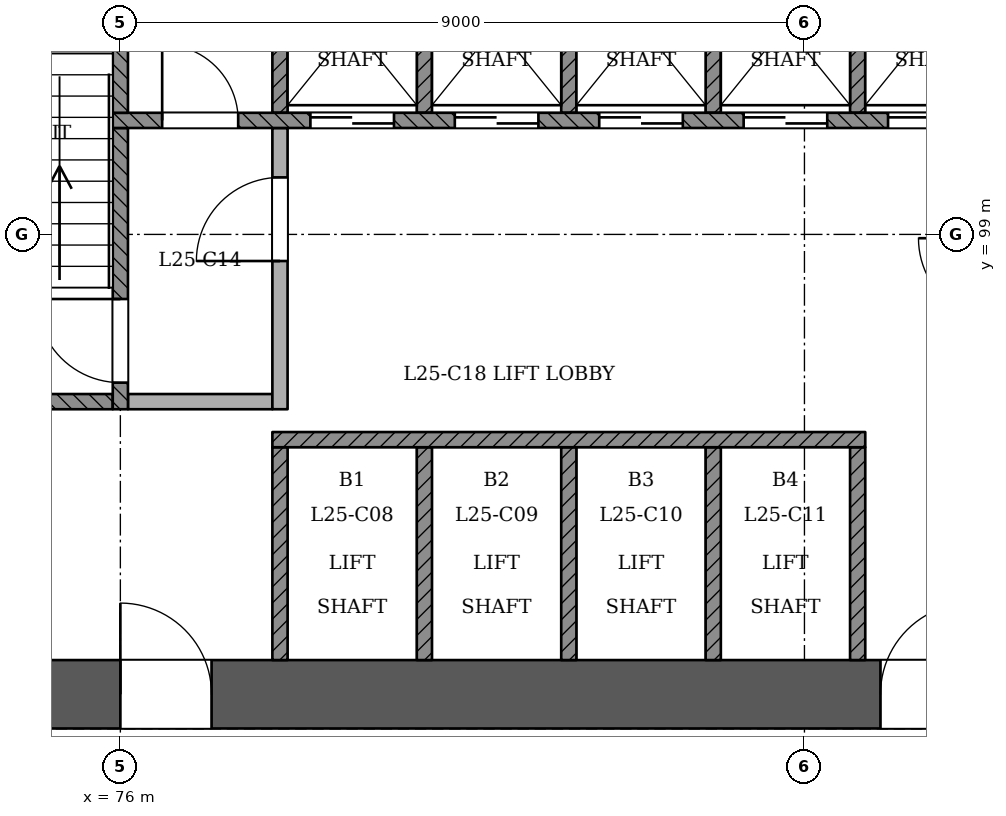
"""IFC4 building model, lengths in metres.
Left out: names, types, materials, properties, quantities, classifications, styles, units other than length and angle.
Written with IfcOpenShell. Run it as: python <this file> out.ifc"""

import sys

from ifc_helpers import new_model, si_unit, direction, frame, frame_2d, origin, place, context, subcontext, project, spatial, rectangle, extrude, element, fill, save


model = new_model("IFC4")
c1 = context("Model", 3, precision=1e-05, world=origin(), true_north=direction((0.0, 1.0)))
c2 = subcontext(c1, "Body", "Model", "MODEL_VIEW")
j1 = project(units=[si_unit("LENGTHUNIT", "METRE"), si_unit("PLANEANGLEUNIT", "RADIAN")], contexts=[c1])
p1 = place(None, origin())
s1 = spatial("IfcSite", under=j1, at=p1, CompositionType="ELEMENT")
p2 = place(p1, origin())
s2 = spatial("IfcBuilding", under=s1, at=p2, CompositionType="ELEMENT")
p3 = place(p2, frame((0.0, 0.0, 100.8)))
s3 = spatial("IfcBuildingStorey", under=s2, at=p3, CompositionType="ELEMENT", Elevation=100.8)
p4 = place(p3, frame((72.55, 92.95, 0.0), z_axis=(0.0, 0.0, 1.0), x_axis=(1.0, 0.0, 0.0)))
e1 = element("IfcWall", 1, at=p4, inside=s3, PredefinedType="SHEAR", context=c2, shape_type="SweptSolid", body=[
    extrude(rectangle(XDim=25.35, YDim=0.9, at=frame_2d((12.675, 0.0))), origin(), (0.0, 0.0, 1.0), 3.6),
])
p5 = place(p4, frame((1.25, 0.0, 0.0)))
e2 = element("IfcOpeningElement", 2, at=p5, cuts=e1, PredefinedType="OPENING", context=c2, shape_type="SweptSolid", body=[
    extrude(rectangle(XDim=1.2, YDim=2.1, at=frame_2d((0.6, 1.05))), frame((0.0, 0.46, 0.0), z_axis=(0.0, -1.0, 0.0), x_axis=(1.0, 0.0, 0.0)), (0.0, 0.0, 1.0), 0.921),
])
p6 = place(p4, frame((3.45, 0.0, 0.0)))
e3 = element("IfcOpeningElement", 3, at=p6, cuts=e1, PredefinedType="OPENING", context=c2, shape_type="SweptSolid", body=[
    extrude(rectangle(XDim=1.2, YDim=2.1, at=frame_2d((0.6, 1.05))), frame((0.0, 0.46, 0.0), z_axis=(0.0, -1.0, 0.0), x_axis=(1.0, 0.0, 0.0)), (0.0, 0.0, 1.0), 0.921),
])
p7 = place(p4, frame((13.45, 0.0, 0.0)))
e4 = element("IfcOpeningElement", 4, at=p7, cuts=e1, PredefinedType="OPENING", context=c2, shape_type="SweptSolid", body=[
    extrude(rectangle(XDim=1.2, YDim=2.1, at=frame_2d((0.6, 1.05))), frame((0.0, 0.46, 0.0), z_axis=(0.0, -1.0, 0.0), x_axis=(1.0, 0.0, 0.0)), (0.0, 0.0, 1.0), 0.921),
])
p8 = place(p4, frame((16.163, 0.0, 0.0)))
e5 = element("IfcOpeningElement", 5, at=p8, cuts=e1, PredefinedType="OPENING", context=c2, shape_type="SweptSolid", body=[
    extrude(rectangle(XDim=1.0, YDim=2.1, at=frame_2d((0.5, 1.05))), frame((0.0, 0.46, 0.0), z_axis=(0.0, -1.0, 0.0), x_axis=(1.0, 0.0, 0.0)), (0.0, 0.0, 1.0), 0.921),
])
p9 = place(p4, frame((20.05, 0.0, 0.0)))
e6 = element("IfcOpeningElement", 6, at=p9, cuts=e1, PredefinedType="OPENING", context=c2, shape_type="SweptSolid", body=[
    extrude(rectangle(XDim=1.0, YDim=2.1, at=frame_2d((0.5, 1.05))), frame((0.0, 0.46, 0.0), z_axis=(0.0, -1.0, 0.0), x_axis=(1.0, 0.0, 0.0)), (0.0, 0.0, 1.0), 0.921),
])
p10 = place(p4, frame((23.188, 0.0, 0.0)))
e7 = element("IfcOpeningElement", 7, at=p10, cuts=e1, PredefinedType="OPENING", context=c2, shape_type="SweptSolid", body=[
    extrude(rectangle(XDim=1.0, YDim=2.1, at=frame_2d((0.5, 1.05))), frame((0.0, 0.46, 0.0), z_axis=(0.0, -1.0, 0.0), x_axis=(1.0, 0.0, 0.0)), (0.0, 0.0, 1.0), 0.921),
])
p11 = place(p3, frame((63.623, 97.706, 0.0), z_axis=(0.0, 0.0, 1.0), x_axis=(0.500000781663, -0.866024952491, 0.0)))
e8 = element("IfcWall", 8, at=p11, inside=s3, PredefinedType="PARTITIONING", context=c2, shape_type="SweptSolid", body=[
    extrude(rectangle(XDim=41.837, YDim=0.15, at=frame_2d((20.919, 0.0))), origin(), (0.0, 0.0, 1.0), 2.7),
])
p12 = place(p11, frame((2.912, 0.0, 0.0)))
e9 = element("IfcOpeningElement", 9, at=p12, cuts=e8, PredefinedType="OPENING", context=c2, shape_type="SweptSolid", body=[
    extrude(rectangle(XDim=1.2, YDim=2.1, at=frame_2d((0.6, 1.05))), frame((0.0, 0.085, 0.0), z_axis=(0.0, -1.0, 0.0), x_axis=(1.0, 0.0, 0.0)), (0.0, 0.0, 1.0), 0.171),
])
p13 = place(p11, frame((10.198, 0.0, 0.0)))
e10 = element("IfcOpeningElement", 10, at=p13, cuts=e8, PredefinedType="OPENING", context=c2, shape_type="SweptSolid", body=[
    extrude(rectangle(XDim=1.0, YDim=2.1, at=frame_2d((0.5, 1.05))), frame((0.0, 0.085, 0.0), z_axis=(0.0, -1.0, 0.0), x_axis=(1.0, 0.0, 0.0)), (0.0, 0.0, 1.0), 0.171),
])
p14 = place(p11, frame((12.523, 0.0, 0.0)))
e11 = element("IfcOpeningElement", 11, at=p14, cuts=e8, PredefinedType="OPENING", context=c2, shape_type="SweptSolid", body=[
    extrude(rectangle(XDim=1.0, YDim=2.1, at=frame_2d((0.5, 1.05))), frame((0.0, 0.085, 0.0), z_axis=(0.0, -1.0, 0.0), x_axis=(1.0, 0.0, 0.0)), (0.0, 0.0, 1.0), 0.171),
])
p15 = place(p11, frame((19.314, 0.0, 0.0)))
e12 = element("IfcOpeningElement", 12, at=p15, cuts=e8, PredefinedType="OPENING", context=c2, shape_type="SweptSolid", body=[
    extrude(rectangle(XDim=1.0, YDim=2.1, at=frame_2d((0.5, 1.05))), frame((0.0, 0.085, 0.0), z_axis=(0.0, -1.0, 0.0), x_axis=(1.0, 0.0, 0.0)), (0.0, 0.0, 1.0), 0.171),
])
p16 = place(p11, frame((21.639, 0.0, 0.0)))
e13 = element("IfcOpeningElement", 13, at=p16, cuts=e8, PredefinedType="OPENING", context=c2, shape_type="SweptSolid", body=[
    extrude(rectangle(XDim=1.0, YDim=2.1, at=frame_2d((0.5, 1.05))), frame((0.0, 0.085, 0.0), z_axis=(0.0, -1.0, 0.0), x_axis=(1.0, 0.0, 0.0)), (0.0, 0.0, 1.0), 0.171),
])
p17 = place(p11, frame((27.169, 0.0, 0.0)))
e14 = element("IfcOpeningElement", 14, at=p17, cuts=e8, PredefinedType="OPENING", context=c2, shape_type="SweptSolid", body=[
    extrude(rectangle(XDim=1.0, YDim=2.1, at=frame_2d((0.5, 1.05))), frame((0.0, 0.085, 0.0), z_axis=(0.0, -1.0, 0.0), x_axis=(1.0, 0.0, 0.0)), (0.0, 0.0, 1.0), 0.171),
])
p18 = place(p11, frame((30.523, 0.0, 0.0)))
e15 = element("IfcOpeningElement", 15, at=p18, cuts=e8, PredefinedType="OPENING", context=c2, shape_type="SweptSolid", body=[
    extrude(rectangle(XDim=1.0, YDim=2.1, at=frame_2d((0.5, 1.05))), frame((0.0, 0.085, 0.0), z_axis=(0.0, -1.0, 0.0), x_axis=(1.0, 0.0, 0.0)), (0.0, 0.0, 1.0), 0.171),
])
p19 = place(p11, frame((37.725, 0.0, 0.0)))
e16 = element("IfcOpeningElement", 16, at=p19, cuts=e8, PredefinedType="OPENING", context=c2, shape_type="SweptSolid", body=[
    extrude(rectangle(XDim=1.2, YDim=2.1, at=frame_2d((0.6, 1.05))), frame((0.0, 0.085, 0.0), z_axis=(0.0, -1.0, 0.0), x_axis=(1.0, 0.0, 0.0)), (0.0, 0.0, 1.0), 0.171),
])
p20 = place(p3, frame((85.458, 61.474, 0.0), z_axis=(0.0, 0.0, 1.0), x_axis=(0.500000781663, 0.866024952491, 0.0)))
e17 = element("IfcWall", 17, at=p20, inside=s3, PredefinedType="PARTITIONING", context=c2, shape_type="SweptSolid", body=[
    extrude(rectangle(XDim=41.837, YDim=0.15, at=frame_2d((20.919, 0.0))), origin(), (0.0, 0.0, 1.0), 2.7),
])
p21 = place(p20, frame((0.253, 0.0, 0.0)))
e18 = element("IfcOpeningElement", 18, at=p21, cuts=e17, PredefinedType="OPENING", context=c2, shape_type="SweptSolid", body=[
    extrude(rectangle(XDim=1.2, YDim=2.1, at=frame_2d((0.6, 1.05))), frame((0.0, 0.085, 0.0), z_axis=(0.0, -1.0, 0.0), x_axis=(1.0, 0.0, 0.0)), (0.0, 0.0, 1.0), 0.171),
])
p22 = place(p20, frame((5.719, 0.0, 0.0)))
e19 = element("IfcOpeningElement", 19, at=p22, cuts=e17, PredefinedType="OPENING", context=c2, shape_type="SweptSolid", body=[
    extrude(rectangle(XDim=1.2, YDim=2.1, at=frame_2d((0.6, 1.05))), frame((0.0, 0.085, 0.0), z_axis=(0.0, -1.0, 0.0), x_axis=(1.0, 0.0, 0.0)), (0.0, 0.0, 1.0), 0.171),
])
p23 = place(p20, frame((13.669, 0.0, 0.0)))
e20 = element("IfcOpeningElement", 20, at=p23, cuts=e17, PredefinedType="OPENING", context=c2, shape_type="SweptSolid", body=[
    extrude(rectangle(XDim=1.0, YDim=2.1, at=frame_2d((0.5, 1.05))), frame((0.0, 0.085, 0.0), z_axis=(0.0, -1.0, 0.0), x_axis=(1.0, 0.0, 0.0)), (0.0, 0.0, 1.0), 0.171),
])
p24 = place(p20, frame((18.169, 0.0, 0.0)))
e21 = element("IfcOpeningElement", 21, at=p24, cuts=e17, PredefinedType="OPENING", context=c2, shape_type="SweptSolid", body=[
    extrude(rectangle(XDim=1.0, YDim=2.1, at=frame_2d((0.5, 1.05))), frame((0.0, 0.085, 0.0), z_axis=(0.0, -1.0, 0.0), x_axis=(1.0, 0.0, 0.0)), (0.0, 0.0, 1.0), 0.171),
])
p25 = place(p20, frame((21.639, 0.0, 0.0)))
e22 = element("IfcOpeningElement", 22, at=p25, cuts=e17, PredefinedType="OPENING", context=c2, shape_type="SweptSolid", body=[
    extrude(rectangle(XDim=1.0, YDim=2.1, at=frame_2d((0.5, 1.05))), frame((0.0, 0.085, 0.0), z_axis=(0.0, -1.0, 0.0), x_axis=(1.0, 0.0, 0.0)), (0.0, 0.0, 1.0), 0.171),
])
p26 = place(p20, frame((27.169, 0.0, 0.0)))
e23 = element("IfcOpeningElement", 23, at=p26, cuts=e17, PredefinedType="OPENING", context=c2, shape_type="SweptSolid", body=[
    extrude(rectangle(XDim=1.0, YDim=2.1, at=frame_2d((0.5, 1.05))), frame((0.0, 0.085, 0.0), z_axis=(0.0, -1.0, 0.0), x_axis=(1.0, 0.0, 0.0)), (0.0, 0.0, 1.0), 0.171),
])
p27 = place(p20, frame((30.639, 0.0, 0.0)))
e24 = element("IfcOpeningElement", 24, at=p27, cuts=e17, PredefinedType="OPENING", context=c2, shape_type="SweptSolid", body=[
    extrude(rectangle(XDim=1.0, YDim=2.1, at=frame_2d((0.5, 1.05))), frame((0.0, 0.085, 0.0), z_axis=(0.0, -1.0, 0.0), x_axis=(1.0, 0.0, 0.0)), (0.0, 0.0, 1.0), 0.171),
])
p28 = place(p20, frame((37.71, 0.0, 0.0)))
e25 = element("IfcOpeningElement", 25, at=p28, cuts=e17, PredefinedType="OPENING", context=c2, shape_type="SweptSolid", body=[
    extrude(rectangle(XDim=1.2, YDim=2.1, at=frame_2d((0.6, 1.05))), frame((0.0, 0.085, 0.0), z_axis=(0.0, -1.0, 0.0), x_axis=(1.0, 0.0, 0.0)), (0.0, 0.0, 1.0), 0.171),
])
for number, where, z_axis, x_axis in (
    (26, (78.1, 93.4, 0.0), (0.0, 0.0, 1.0), (0.0, 1.0, 0.0)),
    (27, (80.0, 93.4, 0.0), (0.0, 0.0, 1.0), (0.0, 1.0, 0.0)),
    (28, (81.9, 93.4, 0.0), (0.0, 0.0, 1.0), (0.0, 1.0, 0.0)),
    (29, (83.8, 93.4, 0.0), (0.0, 0.0, 1.0), (0.0, 1.0, 0.0)),
    (30, (85.7, 93.4, 0.0), (0.0, 0.0, 1.0), (0.0, 1.0, 0.0)),
):
    element("IfcWall", number, at=place(p3, frame(where, z_axis=z_axis, x_axis=x_axis)), inside=s3, PredefinedType="SOLIDWALL", context=c2, shape_type="SweptSolid", body=[
        extrude(rectangle(XDim=2.8, YDim=0.2, at=frame_2d((1.4, 0.0))), origin(), (0.0, 0.0, 1.0), 3.1),
    ])
p29 = place(p3, frame((78.0, 96.3, 0.0), z_axis=(0.0, 0.0, 1.0), x_axis=(1.0, 0.0, 0.0)))
e31 = element("IfcWall", 31, at=p29, inside=s3, PredefinedType="SOLIDWALL", context=c2, shape_type="SweptSolid", body=[
    extrude(rectangle(XDim=7.8, YDim=0.2, at=frame_2d((3.9, 0.0))), origin(), (0.0, 0.0, 1.0), 3.1),
])
p30 = place(p3, frame((73.0, 96.8, 0.0), z_axis=(0.0, 0.0, 1.0), x_axis=(1.0, 0.0, 0.0)))
e32 = element("IfcWall", 32, at=p30, inside=s3, PredefinedType="SOLIDWALL", context=c2, shape_type="SweptSolid", body=[
    extrude(rectangle(XDim=2.9, YDim=0.2, at=frame_2d((1.45, 0.0))), origin(), (0.0, 0.0, 1.0), 3.1),
])
p31 = place(p3, frame((76.0, 96.7, 0.0), z_axis=(0.0, 0.0, 1.0), x_axis=(0.0, 1.0, 0.0)))
e33 = element("IfcWall", 33, at=p31, inside=s3, PredefinedType="SOLIDWALL", context=c2, shape_type="SweptSolid", body=[
    extrude(rectangle(XDim=3.7, YDim=0.2, at=frame_2d((1.85, 0.0))), origin(), (0.0, 0.0, 1.0), 3.1),
])
p32 = place(p31, frame((0.35, 0.0, 0.0)))
e34 = element("IfcOpeningElement", 34, at=p32, cuts=e33, PredefinedType="OPENING", context=c2, shape_type="SweptSolid", body=[
    extrude(rectangle(XDim=1.1, YDim=2.1, at=frame_2d((0.55, 1.05))), frame((0.0, 0.11, 0.0), z_axis=(0.0, -1.0, 0.0), x_axis=(1.0, 0.0, 0.0)), (0.0, 0.0, 1.0), 0.221),
])
p33 = place(p3, frame((76.1, 96.8, 0.0), z_axis=(0.0, 0.0, 1.0), x_axis=(1.0, 0.0, 0.0)))
e35 = element("IfcWall", 35, at=p33, inside=s3, PredefinedType="PARTITIONING", context=c2, shape_type="SweptSolid", body=[
    extrude(rectangle(XDim=1.9, YDim=0.2, at=frame_2d((0.95, 0.0))), origin(), (0.0, 0.0, 1.0), 3.1),
])
p34 = place(p3, frame((78.1, 96.7, 0.0), z_axis=(0.0, 0.0, 1.0), x_axis=(0.0, 1.0, 0.0)))
e36 = element("IfcWall", 36, at=p34, inside=s3, PredefinedType="PARTITIONING", context=c2, shape_type="SweptSolid", body=[
    extrude(rectangle(XDim=3.7, YDim=0.2, at=frame_2d((1.85, 0.0))), origin(), (0.0, 0.0, 1.0), 3.1),
])
p35 = place(p34, frame((1.95, 0.0, 0.0)))
e37 = element("IfcOpeningElement", 37, at=p35, cuts=e36, PredefinedType="OPENING", context=c2, shape_type="SweptSolid", body=[
    extrude(rectangle(XDim=1.1, YDim=2.1, at=frame_2d((0.55, 1.05))), frame((0.0, 0.11, 0.0), z_axis=(0.0, -1.0, 0.0), x_axis=(1.0, 0.0, 0.0)), (0.0, 0.0, 1.0), 0.221),
])
p36 = place(p3, frame((75.9, 100.5, 0.0), z_axis=(0.0, 0.0, 1.0), x_axis=(1.0, 0.0, 0.0)))
e38 = element("IfcWall", 38, at=p36, inside=s3, PredefinedType="SOLIDWALL", context=c2, shape_type="SweptSolid", body=[
    extrude(rectangle(XDim=18.2, YDim=0.2, at=frame_2d((9.1, 0.0))), origin(), (0.0, 0.0, 1.0), 3.1),
])
p37 = place(p36, frame((2.6, 0.0, 0.0)))
e39 = element("IfcOpeningElement", 39, at=p37, cuts=e38, PredefinedType="OPENING", context=c2, shape_type="SweptSolid", body=[
    extrude(rectangle(XDim=1.1, YDim=2.1, at=frame_2d((0.55, 1.05))), frame((0.0, 0.11, 0.0), z_axis=(0.0, -1.0, 0.0), x_axis=(1.0, 0.0, 0.0)), (0.0, 0.0, 1.0), 0.221),
])
p38 = place(p36, frame((4.5, 0.0, 0.0)))
e40 = element("IfcOpeningElement", 40, at=p38, cuts=e38, PredefinedType="OPENING", context=c2, shape_type="SweptSolid", body=[
    extrude(rectangle(XDim=1.1, YDim=2.1, at=frame_2d((0.55, 1.05))), frame((0.0, 0.11, 0.0), z_axis=(0.0, -1.0, 0.0), x_axis=(1.0, 0.0, 0.0)), (0.0, 0.0, 1.0), 0.221),
])
p39 = place(p36, frame((6.4, 0.0, 0.0)))
e41 = element("IfcOpeningElement", 41, at=p39, cuts=e38, PredefinedType="OPENING", context=c2, shape_type="SweptSolid", body=[
    extrude(rectangle(XDim=1.1, YDim=2.1, at=frame_2d((0.55, 1.05))), frame((0.0, 0.11, 0.0), z_axis=(0.0, -1.0, 0.0), x_axis=(1.0, 0.0, 0.0)), (0.0, 0.0, 1.0), 0.221),
])
p40 = place(p36, frame((8.3, 0.0, 0.0)))
e42 = element("IfcOpeningElement", 42, at=p40, cuts=e38, PredefinedType="OPENING", context=c2, shape_type="SweptSolid", body=[
    extrude(rectangle(XDim=1.1, YDim=2.1, at=frame_2d((0.55, 1.05))), frame((0.0, 0.11, 0.0), z_axis=(0.0, -1.0, 0.0), x_axis=(1.0, 0.0, 0.0)), (0.0, 0.0, 1.0), 0.221),
])
p41 = place(p36, frame((10.2, 0.0, 0.0)))
e43 = element("IfcOpeningElement", 43, at=p41, cuts=e38, PredefinedType="OPENING", context=c2, shape_type="SweptSolid", body=[
    extrude(rectangle(XDim=1.1, YDim=2.1, at=frame_2d((0.55, 1.05))), frame((0.0, 0.11, 0.0), z_axis=(0.0, -1.0, 0.0), x_axis=(1.0, 0.0, 0.0)), (0.0, 0.0, 1.0), 0.221),
])
p42 = place(p36, frame((12.1, 0.0, 0.0)))
e44 = element("IfcOpeningElement", 44, at=p42, cuts=e38, PredefinedType="OPENING", context=c2, shape_type="SweptSolid", body=[
    extrude(rectangle(XDim=1.1, YDim=2.1, at=frame_2d((0.55, 1.05))), frame((0.0, 0.11, 0.0), z_axis=(0.0, -1.0, 0.0), x_axis=(1.0, 0.0, 0.0)), (0.0, 0.0, 1.0), 0.221),
])
p43 = place(p36, frame((14.0, 0.0, 0.0)))
e45 = element("IfcOpeningElement", 45, at=p43, cuts=e38, PredefinedType="OPENING", context=c2, shape_type="SweptSolid", body=[
    extrude(rectangle(XDim=1.1, YDim=2.1, at=frame_2d((0.55, 1.05))), frame((0.0, 0.11, 0.0), z_axis=(0.0, -1.0, 0.0), x_axis=(1.0, 0.0, 0.0)), (0.0, 0.0, 1.0), 0.221),
])
p44 = place(p36, frame((0.65, 0.0, 0.0)))
e46 = element("IfcOpeningElement", 46, at=p44, cuts=e38, PredefinedType="OPENING", context=c2, shape_type="SweptSolid", body=[
    extrude(rectangle(XDim=1.0, YDim=2.1, at=frame_2d((0.5, 1.05))), frame((0.0, 0.11, 0.0), z_axis=(0.0, -1.0, 0.0), x_axis=(1.0, 0.0, 0.0)), (0.0, 0.0, 1.0), 0.221),
])
p45 = place(p36, frame((16.3, 0.0, 0.0)))
e47 = element("IfcOpeningElement", 47, at=p45, cuts=e38, PredefinedType="OPENING", context=c2, shape_type="SweptSolid", body=[
    extrude(rectangle(XDim=1.0, YDim=2.1, at=frame_2d((0.5, 1.05))), frame((0.0, 0.11, 0.0), z_axis=(0.0, -1.0, 0.0), x_axis=(1.0, 0.0, 0.0)), (0.0, 0.0, 1.0), 0.221),
])
for number, where, z_axis, x_axis in (
    (48, (76.0, 100.6, 0.0), (0.0, 0.0, 1.0), (0.0, 1.0, 0.0)),
    (49, (78.1, 100.6, 0.0), (0.0, 0.0, 1.0), (0.0, 1.0, 0.0)),
    (50, (80.0, 100.6, 0.0), (0.0, 0.0, 1.0), (0.0, 1.0, 0.0)),
    (51, (81.9, 100.6, 0.0), (0.0, 0.0, 1.0), (0.0, 1.0, 0.0)),
    (52, (83.8, 100.6, 0.0), (0.0, 0.0, 1.0), (0.0, 1.0, 0.0)),
    (53, (85.7, 100.6, 0.0), (0.0, 0.0, 1.0), (0.0, 1.0, 0.0)),
):
    element("IfcWall", number, at=place(p3, frame(where, z_axis=z_axis, x_axis=x_axis)), inside=s3, PredefinedType="SOLIDWALL", context=c2, shape_type="SweptSolid", body=[
        extrude(rectangle(XDim=2.8, YDim=0.2, at=frame_2d((1.4, 0.0))), origin(), (0.0, 0.0, 1.0), 3.1),
    ])
p46 = place(p37, origin())
e54 = element("IfcDoor", 54, at=p46, inside=s3, OperationType="SLIDING_TO_RIGHT", PredefinedType="NOTDEFINED", context=c2, shape_type="SweptSolid", body=[
    extrude(rectangle(XDim=1.1, YDim=2.1, at=frame_2d((0.55, 1.05))), frame((0.0, 0.025, 0.0), z_axis=(0.0, -1.0, 0.0), x_axis=(1.0, 0.0, 0.0)), (0.0, 0.0, 1.0), 0.05),
])
fill(e39, e54)
p47 = place(p38, origin())
e55 = element("IfcDoor", 55, at=p47, inside=s3, OperationType="SLIDING_TO_LEFT", PredefinedType="NOTDEFINED", context=c2, shape_type="SweptSolid", body=[
    extrude(rectangle(XDim=1.1, YDim=2.1, at=frame_2d((0.55, 1.05))), frame((0.0, 0.025, 0.0), z_axis=(0.0, -1.0, 0.0), x_axis=(1.0, 0.0, 0.0)), (0.0, 0.0, 1.0), 0.05),
])
fill(e40, e55)
p48 = place(p39, origin())
e56 = element("IfcDoor", 56, at=p48, inside=s3, OperationType="SLIDING_TO_RIGHT", PredefinedType="NOTDEFINED", context=c2, shape_type="SweptSolid", body=[
    extrude(rectangle(XDim=1.1, YDim=2.1, at=frame_2d((0.55, 1.05))), frame((0.0, 0.025, 0.0), z_axis=(0.0, -1.0, 0.0), x_axis=(1.0, 0.0, 0.0)), (0.0, 0.0, 1.0), 0.05),
])
fill(e41, e56)
p49 = place(p40, origin())
e57 = element("IfcDoor", 57, at=p49, inside=s3, OperationType="SLIDING_TO_LEFT", PredefinedType="NOTDEFINED", context=c2, shape_type="SweptSolid", body=[
    extrude(rectangle(XDim=1.1, YDim=2.1, at=frame_2d((0.55, 1.05))), frame((0.0, 0.025, 0.0), z_axis=(0.0, -1.0, 0.0), x_axis=(1.0, 0.0, 0.0)), (0.0, 0.0, 1.0), 0.05),
])
fill(e42, e57)
p50 = place(p41, origin())
e58 = element("IfcDoor", 58, at=p50, inside=s3, OperationType="SLIDING_TO_RIGHT", PredefinedType="NOTDEFINED", context=c2, shape_type="SweptSolid", body=[
    extrude(rectangle(XDim=1.1, YDim=2.1, at=frame_2d((0.55, 1.05))), frame((0.0, 0.025, 0.0), z_axis=(0.0, -1.0, 0.0), x_axis=(1.0, 0.0, 0.0)), (0.0, 0.0, 1.0), 0.05),
])
fill(e43, e58)
p51 = place(p32, origin())
e59 = element("IfcDoor", 59, at=p51, inside=s3, OperationType="SINGLE_SWING_RIGHT", PredefinedType="NOTDEFINED", context=c2, shape_type="SweptSolid", body=[
    extrude(rectangle(XDim=1.1, YDim=2.1, at=frame_2d((0.55, 1.05))), frame((0.0, 0.025, 0.0), z_axis=(0.0, -1.0, 0.0), x_axis=(1.0, 0.0, 0.0)), (0.0, 0.0, 1.0), 0.05),
])
fill(e34, e59)
p52 = place(p35, origin())
e60 = element("IfcDoor", 60, at=p52, inside=s3, OperationType="SINGLE_SWING_LEFT", PredefinedType="NOTDEFINED", context=c2, shape_type="SweptSolid", body=[
    extrude(rectangle(XDim=1.1, YDim=2.1, at=frame_2d((0.55, 1.05))), frame((0.0, 0.025, 0.0), z_axis=(0.0, -1.0, 0.0), x_axis=(1.0, 0.0, 0.0)), (0.0, 0.0, 1.0), 0.05),
])
fill(e37, e60)
p53 = place(p6, origin())
e61 = element("IfcDoor", 61, at=p53, inside=s3, OperationType="SINGLE_SWING_LEFT", PredefinedType="NOTDEFINED", context=c2, shape_type="SweptSolid", body=[
    extrude(rectangle(XDim=1.2, YDim=2.1, at=frame_2d((0.6, 1.05))), frame((0.0, 0.025, 0.0), z_axis=(0.0, -1.0, 0.0), x_axis=(1.0, 0.0, 0.0)), (0.0, 0.0, 1.0), 0.05),
])
fill(e3, e61)
p54 = place(p7, origin())
e62 = element("IfcDoor", 62, at=p54, inside=s3, OperationType="SINGLE_SWING_RIGHT", PredefinedType="NOTDEFINED", context=c2, shape_type="SweptSolid", body=[
    extrude(rectangle(XDim=1.2, YDim=2.1, at=frame_2d((0.6, 1.05))), frame((0.0, 0.025, 0.0), z_axis=(0.0, -1.0, 0.0), x_axis=(1.0, 0.0, 0.0)), (0.0, 0.0, 1.0), 0.05),
])
fill(e4, e62)
p55 = place(p44, origin())
e63 = element("IfcDoor", 63, at=p55, inside=s3, OperationType="SINGLE_SWING_LEFT", PredefinedType="NOTDEFINED", context=c2, shape_type="SweptSolid", body=[
    extrude(rectangle(XDim=1.0, YDim=2.1, at=frame_2d((0.5, 1.05))), frame((0.0, 0.025, 0.0), z_axis=(0.0, -1.0, 0.0), x_axis=(1.0, 0.0, 0.0)), (0.0, 0.0, 1.0), 0.05),
])
fill(e46, e63)
save(model, sys.argv[1])
